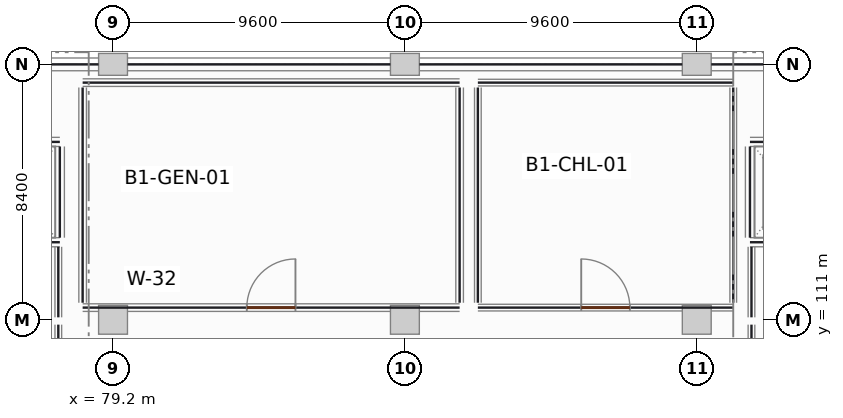
"""IFC4 building model, lengths in metres.
Left out: names, types, materials, properties, quantities, classifications, styles, units other than length and angle.
Written with IfcOpenShell. Run it as: python <this file> out.ifc"""

import sys

from ifc_helpers import new_model, si_unit, direction, frame, frame_2d, origin, origin_2d, place, context, subcontext, project, spatial, rectangle, extrude, element, fill, save


model = new_model("IFC4")
c1 = context("Model", 3, precision=1e-05, world=origin(), true_north=direction((0.0, 1.0)))
c2 = subcontext(c1, "Body", "Model", "MODEL_VIEW")
j1 = project(units=[si_unit("LENGTHUNIT", "METRE"), si_unit("PLANEANGLEUNIT", "RADIAN")], contexts=[c1])
p1 = place(None, origin())
s1 = spatial("IfcSite", under=j1, at=p1, CompositionType="ELEMENT")
p2 = place(p1, origin())
s2 = spatial("IfcBuilding", under=s1, at=p2, CompositionType="ELEMENT")
p3 = place(p2, frame((0.0, 0.0, -4.5)))
s3 = spatial("IfcBuildingStorey", under=s2, at=p3, CompositionType="ELEMENT", Elevation=-4.5)
p4 = place(p3, frame((79.2, 111.0, 0.0), z_axis=(0.0, 0.0, 1.0), x_axis=(1.0, 0.0, 0.0)))
e1 = element("IfcColumn", 1, at=p4, inside=s3, PredefinedType="COLUMN", context=c2, shape_type="SweptSolid", body=[
    extrude(rectangle(XDim=0.95, YDim=0.95, at=origin_2d()), origin(), (0.0, 0.0, 1.0), 4.14),
])
p5 = place(p3, frame((79.2, 119.4, 0.0), z_axis=(0.0, 0.0, 1.0), x_axis=(1.0, 0.0, 0.0)))
e2 = element("IfcColumn", 2, at=p5, inside=s3, PredefinedType="COLUMN", context=c2, shape_type="SweptSolid", body=[
    extrude(rectangle(XDim=0.95, YDim=0.72, at=origin_2d()), origin(), (0.0, 0.0, 1.0), 4.14),
])
p6 = place(p3, frame((88.8, 111.0, 0.0), z_axis=(0.0, 0.0, 1.0), x_axis=(1.0, 0.0, 0.0)))
e3 = element("IfcColumn", 3, at=p6, inside=s3, PredefinedType="COLUMN", context=c2, shape_type="SweptSolid", body=[
    extrude(rectangle(XDim=0.95, YDim=0.95, at=origin_2d()), origin(), (0.0, 0.0, 1.0), 4.14),
])
p7 = place(p3, frame((88.8, 119.4, 0.0), z_axis=(0.0, 0.0, 1.0), x_axis=(1.0, 0.0, 0.0)))
e4 = element("IfcColumn", 4, at=p7, inside=s3, PredefinedType="COLUMN", context=c2, shape_type="SweptSolid", body=[
    extrude(rectangle(XDim=0.95, YDim=0.72, at=origin_2d()), origin(), (0.0, 0.0, 1.0), 4.14),
])
p8 = place(p3, frame((98.4, 111.0, 0.0), z_axis=(0.0, 0.0, 1.0), x_axis=(1.0, 0.0, 0.0)))
e5 = element("IfcColumn", 5, at=p8, inside=s3, PredefinedType="COLUMN", context=c2, shape_type="SweptSolid", body=[
    extrude(rectangle(XDim=0.95, YDim=0.95, at=origin_2d()), origin(), (0.0, 0.0, 1.0), 4.14),
])
p9 = place(p3, frame((98.4, 119.4, 0.0), z_axis=(0.0, 0.0, 1.0), x_axis=(1.0, 0.0, 0.0)))
e6 = element("IfcColumn", 6, at=p9, inside=s3, PredefinedType="COLUMN", context=c2, shape_type="SweptSolid", body=[
    extrude(rectangle(XDim=0.95, YDim=0.72, at=origin_2d()), origin(), (0.0, 0.0, 1.0), 4.14),
])
p10 = place(p3, frame((74.476, 119.4, 0.0), z_axis=(0.0, 0.0, 1.0), x_axis=(1.0, 0.0, 0.0)))
e7 = element("IfcWall", 7, at=p10, inside=s3, PredefinedType="SOLIDWALL", context=c2, shape_type="SweptSolid", body=[
    extrude(rectangle(XDim=4.247, YDim=0.42, at=frame_2d((2.124, 0.0))), origin(), (0.0, 0.0, 1.0), 4.135),
])
for number, where, z_axis, x_axis in (
    (8, (79.677, 119.4, 0.0), (0.0, 0.0, 1.0), (1.0, 0.0, 0.0)),
    (9, (89.277, 119.4, 0.0), (0.0, 0.0, 1.0), (1.0, 0.0, 0.0)),
):
    element("IfcWall", number, at=place(p3, frame(where, z_axis=z_axis, x_axis=x_axis)), inside=s3, PredefinedType="SOLIDWALL", context=c2, shape_type="SweptSolid", body=[
        extrude(rectangle(XDim=8.646, YDim=0.42, at=frame_2d((4.323, 0.0))), origin(), (0.0, 0.0, 1.0), 4.135),
    ])
p11 = place(p3, frame((98.877, 119.4, 0.0), z_axis=(0.0, 0.0, 1.0), x_axis=(1.0, 0.0, 0.0)))
e10 = element("IfcWall", 10, at=p11, inside=s3, PredefinedType="SOLIDWALL", context=c2, shape_type="SweptSolid", body=[
    extrude(rectangle(XDim=4.297, YDim=0.42, at=frame_2d((2.148, 0.0))), origin(), (0.0, 0.0, 1.0), 4.135),
])
p12 = place(p3, frame((74.7, 113.55, 0.0), z_axis=(0.0, 0.0, 1.0), x_axis=(1.0, 0.0, 0.0)))
e11 = element("IfcWall", 11, at=p12, inside=s3, PredefinedType="SHEAR", context=c2, shape_type="SweptSolid", body=[
    extrude(rectangle(XDim=2.75, YDim=0.3, at=frame_2d((1.375, 0.0))), origin(), (0.0, 0.0, 1.0), 4.14),
])
p13 = place(p12, frame((0.775, 0.0, 0.0)))
e12 = element("IfcOpeningElement", 12, at=p13, cuts=e11, PredefinedType="OPENING", context=c2, shape_type="SweptSolid", body=[
    extrude(rectangle(XDim=1.2, YDim=2.2, at=frame_2d((0.6, 1.1))), frame((0.0, 0.16, 0.0), z_axis=(0.0, -1.0, 0.0), x_axis=(1.0, 0.0, 0.0)), (0.0, 0.0, 1.0), 0.32),
])
p14 = place(p3, frame((74.7, 116.85, 0.0), z_axis=(0.0, 0.0, 1.0), x_axis=(1.0, 0.0, 0.0)))
e13 = element("IfcWall", 13, at=p14, inside=s3, PredefinedType="SHEAR", context=c2, shape_type="SweptSolid", body=[
    extrude(rectangle(XDim=2.75, YDim=0.3, at=frame_2d((1.375, 0.0))), origin(), (0.0, 0.0, 1.0), 4.14),
])
p15 = place(p3, frame((77.45, 113.7, 0.0), z_axis=(0.0, 0.0, 1.0), x_axis=(0.0, 1.0, 0.0)))
e14 = element("IfcWall", 14, at=p15, inside=s3, PredefinedType="SHEAR", context=c2, shape_type="SweptSolid", body=[
    extrude(rectangle(XDim=3.0, YDim=0.3, at=frame_2d((1.5, 0.0))), origin(), (0.0, 0.0, 1.0), 4.14),
])
p16 = place(p3, frame((100.15, 113.55, 0.0), z_axis=(0.0, 0.0, 1.0), x_axis=(1.0, 0.0, 0.0)))
e15 = element("IfcWall", 15, at=p16, inside=s3, PredefinedType="SHEAR", context=c2, shape_type="SweptSolid", body=[
    extrude(rectangle(XDim=2.825, YDim=0.3, at=frame_2d((1.413, 0.0))), origin(), (0.0, 0.0, 1.0), 4.14),
])
p17 = place(p16, frame((0.812, 0.0, 0.0)))
e16 = element("IfcOpeningElement", 16, at=p17, cuts=e15, PredefinedType="OPENING", context=c2, shape_type="SweptSolid", body=[
    extrude(rectangle(XDim=1.2, YDim=2.2, at=frame_2d((0.6, 1.1))), frame((0.0, 0.16, 0.0), z_axis=(0.0, -1.0, 0.0), x_axis=(1.0, 0.0, 0.0)), (0.0, 0.0, 1.0), 0.32),
])
p18 = place(p3, frame((100.15, 116.85, 0.0), z_axis=(0.0, 0.0, 1.0), x_axis=(1.0, 0.0, 0.0)))
e17 = element("IfcWall", 17, at=p18, inside=s3, PredefinedType="SHEAR", context=c2, shape_type="SweptSolid", body=[
    extrude(rectangle(XDim=2.825, YDim=0.3, at=frame_2d((1.413, 0.0))), origin(), (0.0, 0.0, 1.0), 4.14),
])
p19 = place(p3, frame((100.15, 113.7, 0.0), z_axis=(0.0, 0.0, 1.0), x_axis=(0.0, 1.0, 0.0)))
e18 = element("IfcWall", 18, at=p19, inside=s3, PredefinedType="SHEAR", context=c2, shape_type="SweptSolid", body=[
    extrude(rectangle(XDim=3.0, YDim=0.3, at=frame_2d((1.5, 0.0))), origin(), (0.0, 0.0, 1.0), 4.14),
])
p20 = place(p3, frame((77.4, 111.08, 0.0), z_axis=(0.0, 0.0, 1.0), x_axis=(0.0, 1.0, 0.0)))
e19 = element("IfcWall", 19, at=p20, inside=s3, PredefinedType="PARTITIONING", context=c2, shape_type="SweptSolid", body=[
    extrude(rectangle(XDim=2.32, YDim=0.22, at=frame_2d((1.16, 0.0))), origin(), (0.0, 0.0, 1.0), 3.22),
])
p21 = place(p3, frame((77.4, 107.76, 0.0), z_axis=(0.0, 0.0, 1.0), x_axis=(0.0, 1.0, 0.0)))
e20 = element("IfcWall", 20, at=p21, inside=s3, PredefinedType="PARTITIONING", context=c2, shape_type="SweptSolid", body=[
    extrude(rectangle(XDim=3.08, YDim=0.22, at=frame_2d((1.54, 0.0))), origin(), (0.0, 0.0, 1.0), 3.22),
])
p22 = place(p3, frame((100.2, 111.08, 0.0), z_axis=(0.0, 0.0, 1.0), x_axis=(0.0, 1.0, 0.0)))
e21 = element("IfcWall", 21, at=p22, inside=s3, PredefinedType="PARTITIONING", context=c2, shape_type="SweptSolid", body=[
    extrude(rectangle(XDim=2.32, YDim=0.22, at=frame_2d((1.16, 0.0))), origin(), (0.0, 0.0, 1.0), 3.22),
])
p23 = place(p3, frame((100.2, 107.76, 0.0), z_axis=(0.0, 0.0, 1.0), x_axis=(0.0, 1.0, 0.0)))
e22 = element("IfcWall", 22, at=p23, inside=s3, PredefinedType="PARTITIONING", context=c2, shape_type="SweptSolid", body=[
    extrude(rectangle(XDim=3.08, YDim=0.22, at=frame_2d((1.54, 0.0))), origin(), (0.0, 0.0, 1.0), 3.22),
])
p24 = place(p3, frame((78.2, 111.4, 0.0), z_axis=(0.0, 0.0, 1.0), x_axis=(1.0, 0.0, 0.0)))
e23 = element("IfcWall", 23, at=p24, inside=s3, PredefinedType="PARTITIONING", context=c2, shape_type="SweptSolid", body=[
    extrude(rectangle(XDim=12.4, YDim=0.25, at=frame_2d((6.2, 0.0))), origin(), (0.0, 0.0, 1.0), 3.22),
])
p25 = place(p24, frame((5.4, 0.0, 0.0)))
e24 = element("IfcOpeningElement", 24, at=p25, cuts=e23, PredefinedType="OPENING", context=c2, shape_type="SweptSolid", body=[
    extrude(rectangle(XDim=1.6, YDim=2.3, at=frame_2d((0.8, 1.15))), frame((0.0, 0.135, 0.0), z_axis=(0.0, -1.0, 0.0), x_axis=(1.0, 0.0, 0.0)), (0.0, 0.0, 1.0), 0.27),
])
p26 = place(p3, frame((78.2, 118.8, 0.0), z_axis=(0.0, 0.0, 1.0), x_axis=(1.0, 0.0, 0.0)))
e25 = element("IfcWall", 25, at=p26, inside=s3, PredefinedType="PARTITIONING", context=c2, shape_type="SweptSolid", body=[
    extrude(rectangle(XDim=12.4, YDim=0.25, at=frame_2d((6.2, 0.0))), origin(), (0.0, 0.0, 1.0), 3.22),
])
for number, where, z_axis, x_axis in (
    (26, (78.2, 111.56, 0.0), (0.0, 0.0, 1.0), (0.0, 1.0, 0.0)),
    (27, (90.6, 111.56, 0.0), (0.0, 0.0, 1.0), (0.0, 1.0, 0.0)),
):
    element("IfcWall", number, at=place(p3, frame(where, z_axis=z_axis, x_axis=x_axis)), inside=s3, PredefinedType="PARTITIONING", context=c2, shape_type="SweptSolid", body=[
        extrude(rectangle(XDim=7.08, YDim=0.25, at=frame_2d((3.54, 0.0))), origin(), (0.0, 0.0, 1.0), 3.22),
    ])
p27 = place(p3, frame((91.2, 111.4, 0.0), z_axis=(0.0, 0.0, 1.0), x_axis=(1.0, 0.0, 0.0)))
e28 = element("IfcWall", 28, at=p27, inside=s3, PredefinedType="PARTITIONING", context=c2, shape_type="SweptSolid", body=[
    extrude(rectangle(XDim=8.4, YDim=0.22, at=frame_2d((4.2, 0.0))), origin(), (0.0, 0.0, 1.0), 3.22),
])
p28 = place(p27, frame((3.4, 0.0, 0.0)))
e29 = element("IfcOpeningElement", 29, at=p28, cuts=e28, PredefinedType="OPENING", context=c2, shape_type="SweptSolid", body=[
    extrude(rectangle(XDim=1.6, YDim=2.3, at=frame_2d((0.8, 1.15))), frame((0.0, 0.12, 0.0), z_axis=(0.0, -1.0, 0.0), x_axis=(1.0, 0.0, 0.0)), (0.0, 0.0, 1.0), 0.24),
])
p29 = place(p3, frame((91.2, 118.8, 0.0), z_axis=(0.0, 0.0, 1.0), x_axis=(1.0, 0.0, 0.0)))
e30 = element("IfcWall", 30, at=p29, inside=s3, PredefinedType="PARTITIONING", context=c2, shape_type="SweptSolid", body=[
    extrude(rectangle(XDim=8.4, YDim=0.22, at=frame_2d((4.2, 0.0))), origin(), (0.0, 0.0, 1.0), 3.22),
])
for number, where, z_axis, x_axis in (
    (31, (91.2, 111.56, 0.0), (0.0, 0.0, 1.0), (0.0, 1.0, 0.0)),
    (32, (99.6, 111.56, 0.0), (0.0, 0.0, 1.0), (0.0, 1.0, 0.0)),
):
    element("IfcWall", number, at=place(p3, frame(where, z_axis=z_axis, x_axis=x_axis)), inside=s3, PredefinedType="PARTITIONING", context=c2, shape_type="SweptSolid", body=[
        extrude(rectangle(XDim=7.08, YDim=0.22, at=frame_2d((3.54, 0.0))), origin(), (0.0, 0.0, 1.0), 3.22),
    ])
p30 = place(p25, origin())
e33 = element("IfcDoor", 33, at=p30, inside=s3, OperationType="SINGLE_SWING_RIGHT", PredefinedType="DOOR", context=c2, shape_type="SweptSolid", body=[
    extrude(rectangle(XDim=1.6, YDim=2.3, at=frame_2d((0.8, 1.15))), frame((0.0, 0.025, 0.0), z_axis=(0.0, -1.0, 0.0), x_axis=(1.0, 0.0, 0.0)), (0.0, 0.0, 1.0), 0.05),
])
fill(e24, e33)
p31 = place(p28, origin())
e34 = element("IfcDoor", 34, at=p31, inside=s3, OperationType="SINGLE_SWING_LEFT", PredefinedType="DOOR", context=c2, shape_type="SweptSolid", body=[
    extrude(rectangle(XDim=1.6, YDim=2.3, at=frame_2d((0.8, 1.15))), frame((0.0, 0.025, 0.0), z_axis=(0.0, -1.0, 0.0), x_axis=(1.0, 0.0, 0.0)), (0.0, 0.0, 1.0), 0.05),
])
fill(e29, e34)
save(model, sys.argv[1])
